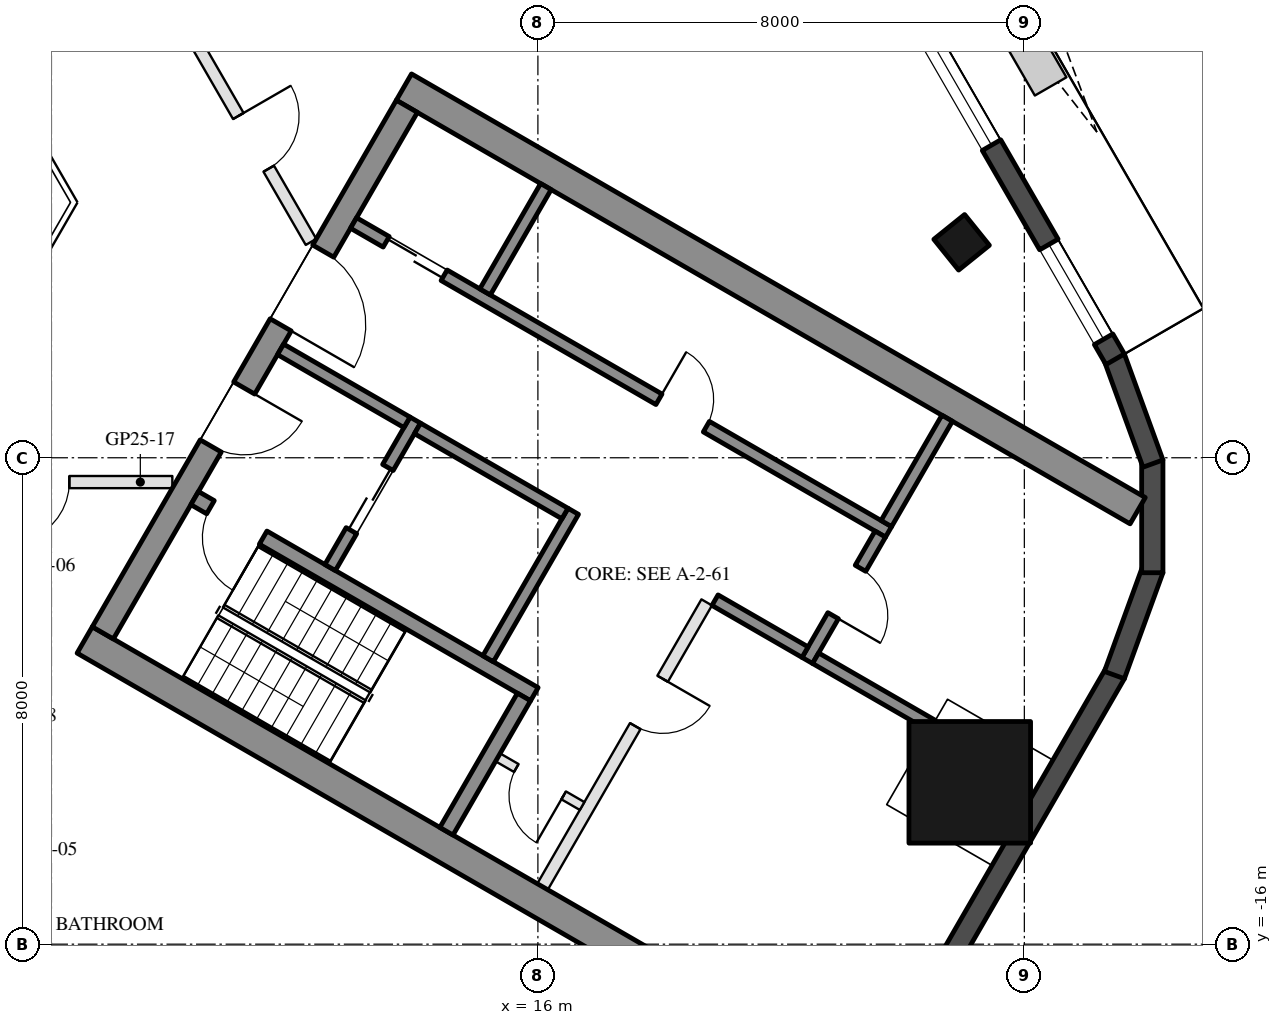
"""IFC4 building model, lengths in metres.
Left out: names, types, materials, properties, quantities, classifications, styles, units other than length and angle.
Written with IfcOpenShell. Run it as: python <this file> out.ifc"""

import sys

from ifc_helpers import new_model, si_unit, direction, frame, frame_2d, origin, origin_2d, place, context, subcontext, project, spatial, rectangle, hollow_rectangle, extrude, boolean, halfspace, element, fill, save


model = new_model("IFC4")
c1 = context("Model", 3, precision=1e-05, world=origin(), true_north=direction((0.0, 1.0)))
c2 = subcontext(c1, "Body", "Model", "MODEL_VIEW")
j1 = project(units=[si_unit("LENGTHUNIT", "METRE"), si_unit("PLANEANGLEUNIT", "RADIAN")], contexts=[c1])
p1 = place(None, origin())
s1 = spatial("IfcSite", under=j1, at=p1, CompositionType="ELEMENT")
p2 = place(p1, origin())
s2 = spatial("IfcBuilding", under=s1, at=p2, CompositionType="ELEMENT")
p3 = place(p2, frame((0.0, 0.0, 265.2)))
s3 = spatial("IfcBuildingStorey", under=s2, at=p3, CompositionType="ELEMENT", Elevation=265.2)
p4 = place(p3, frame((22.968, -4.457, 0.0), z_axis=(-0.190735471498, 0.029652697198, 0.981193506634), x_axis=(0.488320350716, -0.86422901804, 0.121043130549)))
e1 = element("IfcColumn", 1, at=p4, inside=s3, PredefinedType="COLUMN", context=c2, shape_type="SweptSolid", body=[
    boolean("DIFFERENCE", boolean("DIFFERENCE", extrude(hollow_rectangle(XDim=0.65, YDim=0.65, WallThickness=0.03, at=origin_2d()), origin(), (0.0, 0.0, 1.0), 3.771), halfspace(frame((0.0, 0.0, 0.047), z_axis=(0.0, 0.0, 1.0), x_axis=(1.0, 0.0, 0.0)), True)), halfspace(frame((0.0, 0.0, 3.724), z_axis=(0.0, 0.0, 1.0), x_axis=(1.0, 0.0, 0.0)), False)),
])
p5 = place(p3, frame((23.102, -13.338, 0.0), z_axis=(-0.190346159062, 0.109881938965, 0.975548204457), x_axis=(0.499994868029, 0.866028366632, 1.1507946e-05)))
e2 = element("IfcColumn", 2, at=p5, inside=s3, PredefinedType="COLUMN", context=c2, shape_type="SweptSolid", body=[
    boolean("DIFFERENCE", boolean("DIFFERENCE", extrude(hollow_rectangle(XDim=2.0, YDim=2.0, WallThickness=0.05, at=origin_2d()), origin(), (0.0, 0.0, 1.0), 3.793), halfspace(frame((0.0, 0.0, 0.113), z_axis=(0.0, 0.0, 1.0), x_axis=(1.0, 0.0, 0.0)), True)), halfspace(frame((0.0, 0.0, 3.679), z_axis=(0.0, 0.0, 1.0), x_axis=(1.0, 0.0, 0.0)), False)),
])
p6 = place(p3, frame((22.746, -16.305, 0.0), z_axis=(0.0, 0.0, 1.0), x_axis=(0.500028854569, 0.86600874395, 0.0)))
e3 = element("IfcWall", 3, at=p6, inside=s3, PredefinedType="SOLIDWALL", context=c2, shape_type="SweptSolid", body=[
    extrude(rectangle(XDim=5.495, YDim=0.35, at=frame_2d((2.748, 0.0))), origin(), (0.0, 0.0, 1.0), 3.55),
])
p7 = place(p3, frame((25.481, -11.574, 0.0), z_axis=(0.0, 0.0, 1.0), x_axis=(0.341890986265, 0.93973962006, 0.0)))
e4 = element("IfcWall", 4, at=p7, inside=s3, PredefinedType="SOLIDWALL", context=c2, shape_type="SweptSolid", body=[
    extrude(rectangle(XDim=1.855, YDim=0.35, at=frame_2d((0.928, 0.0))), origin(), (0.0, 0.0, 1.0), 3.55),
])
for number, where, z_axis, x_axis in (
    (5, (26.104, -9.891, 0.0), (0.0, 0.0, 1.0), (0.0, 1.0, 0.0)),
    (6, (26.115, -8.096, 0.0), (0.0, 0.0, 1.0), (-0.342, 0.94, 0.0)),
):
    element("IfcWall", number, at=place(p3, frame(where, z_axis=z_axis, x_axis=x_axis)), inside=s3, PredefinedType="SOLIDWALL", context=c2, shape_type="SweptSolid", body=[
        extrude(rectangle(XDim=1.855, YDim=0.35, at=frame_2d((0.927, 0.0))), origin(), (0.0, 0.0, 1.0), 3.55),
    ])
p8 = place(p3, frame((25.494, -6.38, 0.0), z_axis=(0.0, 0.0, 1.0), x_axis=(-0.499999932627, 0.866025442683, 0.0)))
e7 = element("IfcWall", 7, at=p8, inside=s3, PredefinedType="SOLIDWALL", context=c2, shape_type="SweptSolid", body=[
    extrude(rectangle(XDim=11.5, YDim=0.35, at=frame_2d((5.75, 0.0))), origin(), (0.0, 0.0, 1.0), 3.55),
])
p9 = place(p8, frame((0.38, 0.0, 0.3)))
e8 = element("IfcOpeningElement", 8, at=p9, cuts=e7, PredefinedType="OPENING", context=c2, shape_type="SweptSolid", body=[
    extrude(rectangle(XDim=1.8, YDim=2.65, at=frame_2d((0.9, 1.325))), frame((0.0, 0.185, 0.0), z_axis=(0.0, -1.0, 0.0), x_axis=(1.0, 0.0, 0.0)), (0.0, 0.0, 1.0), 0.37),
])
p10 = place(p8, frame((7.521, 0.0, 0.0)))
e9 = element("IfcOpeningElement", 9, at=p10, cuts=e7, PredefinedType="OPENING", context=c2, shape_type="SweptSolid", body=[
    extrude(rectangle(XDim=2.4, YDim=2.4, at=frame_2d((1.2, 1.2))), frame((0.0, 0.185, 0.0), z_axis=(0.0, -1.0, 0.0), x_axis=(1.0, 0.0, 0.0)), (0.0, 0.0, 1.0), 0.37),
])
p11 = place(p8, frame((4.067, 0.0, 0.3)))
e10 = element("IfcOpeningElement", 10, at=p11, cuts=e7, PredefinedType="OPENING", context=c2, shape_type="SweptSolid", body=[
    extrude(rectangle(XDim=3.1, YDim=2.65, at=frame_2d((1.55, 1.325))), frame((0.0, 0.185, 0.0), z_axis=(0.0, -1.0, 0.0), x_axis=(1.0, 0.0, 0.0)), (0.0, 0.0, 1.0), 0.37),
])
for number, where, z_axis, x_axis in (
    (11, (8.547, -10.997, 0.0), (0.0, 0.0, 1.0), (0.866, -0.5, 0.0)),
    (12, (13.797, -1.903, 0.0), (0.0, 0.0, 1.0), (0.866, -0.5, 0.0)),
):
    element("IfcWall", number, at=place(p3, frame(where, z_axis=z_axis, x_axis=x_axis)), inside=s3, PredefinedType="SHEAR", context=c2, shape_type="SweptSolid", body=[
        extrude(rectangle(XDim=13.934, YDim=0.5, at=frame_2d((6.967, 0.0))), origin(), (0.0, 0.0, 1.0), 3.5),
    ])
p12 = place(p3, frame((8.845, -10.88, 0.0), z_axis=(0.0, 0.0, 1.0), x_axis=(0.500004234368, 0.866022959057, 0.0)))
e13 = element("IfcWall", 13, at=p12, inside=s3, PredefinedType="SHEAR", context=c2, shape_type="SweptSolid", body=[
    extrude(rectangle(XDim=10.0, YDim=0.4, at=frame_2d((5.0, 0.0))), origin(), (0.0, 0.0, 1.0), 3.5),
])
p13 = place(p12, frame((3.55, 0.0, 0.0)))
e14 = element("IfcOpeningElement", 14, at=p13, cuts=e13, PredefinedType="OPENING", context=c2, shape_type="SweptSolid", body=[
    extrude(rectangle(XDim=1.1, YDim=2.1, at=frame_2d((0.55, 1.05))), frame((0.0, 0.21, 0.0), z_axis=(0.0, -1.0, 0.0), x_axis=(1.0, 0.0, 0.0)), (0.0, 0.0, 1.0), 0.42),
])
p14 = place(p12, frame((5.85, 0.0, 0.0)))
e15 = element("IfcOpeningElement", 15, at=p14, cuts=e13, PredefinedType="OPENING", context=c2, shape_type="SweptSolid", body=[
    extrude(rectangle(XDim=1.4, YDim=2.1, at=frame_2d((0.7, 1.05))), frame((0.0, 0.21, 0.0), z_axis=(0.0, -1.0, 0.0), x_axis=(1.0, 0.0, 0.0)), (0.0, 0.0, 1.0), 0.42),
])
p15 = place(p3, frame((10.356, -8.664, 0.0), z_axis=(0.0, 0.0, 1.0), x_axis=(0.866028629588, -0.499994412703, 0.0)))
e16 = element("IfcWall", 16, at=p15, inside=s3, PredefinedType="SHEAR", context=c2, shape_type="SweptSolid", body=[
    extrude(rectangle(XDim=6.45, YDim=0.25, at=frame_2d((3.225, 0.0))), origin(), (0.0, 0.0, 1.0), 3.5),
])
p16 = place(p15, frame((0.3, 0.0, 0.0)))
e17 = element("IfcOpeningElement", 17, at=p16, cuts=e16, PredefinedType="OPENING", context=c2, shape_type="SweptSolid", body=[
    extrude(rectangle(XDim=1.0, YDim=2.1, at=frame_2d((0.5, 1.05))), frame((0.0, 0.135, 0.0), z_axis=(0.0, -1.0, 0.0), x_axis=(1.0, 0.0, 0.0)), (0.0, 0.0, 1.0), 0.27),
])
p17 = place(p3, frame((14.496, -14.143, 0.0), z_axis=(0.0, 0.0, 1.0), x_axis=(0.500062241894, 0.865989465428, 0.0)))
e18 = element("IfcWall", 18, at=p17, inside=s3, PredefinedType="SHEAR", context=c2, shape_type="SweptSolid", body=[
    extrude(rectangle(XDim=2.55, YDim=0.25, at=frame_2d((1.275, 0.0))), origin(), (0.0, 0.0, 1.0), 3.5),
])
p18 = place(p3, frame((15.181, -11.305, 0.0), z_axis=(0.0, 0.0, 1.0), x_axis=(0.49994636267, 0.866056369097, 0.0)))
e19 = element("IfcWall", 19, at=p18, inside=s3, PredefinedType="SHEAR", context=c2, shape_type="SweptSolid", body=[
    extrude(rectangle(XDim=2.8, YDim=0.2, at=frame_2d((1.4, 0.0))), origin(), (0.0, 0.0, 1.0), 3.5),
])
p19 = place(p3, frame((12.583, -9.805, 0.0), z_axis=(0.0, 0.0, 1.0), x_axis=(0.49994636267, 0.866056369097, 0.0)))
e20 = element("IfcWall", 20, at=p19, inside=s3, PredefinedType="SHEAR", context=c2, shape_type="SweptSolid", body=[
    extrude(rectangle(XDim=2.8, YDim=0.2, at=frame_2d((1.4, 0.0))), origin(), (0.0, 0.0, 1.0), 3.5),
])
p20 = place(p19, frame((0.7, 0.0, 0.0)))
e21 = element("IfcOpeningElement", 21, at=p20, cuts=e20, PredefinedType="OPENING", context=c2, shape_type="SweptSolid", body=[
    extrude(rectangle(XDim=1.2, YDim=2.1, at=frame_2d((0.6, 1.05))), frame((0.0, 0.11, 0.0), z_axis=(0.0, -1.0, 0.0), x_axis=(1.0, 0.0, 0.0)), (0.0, 0.0, 1.0), 0.22),
])
p21 = place(p3, frame((11.768, -6.217, 0.0), z_axis=(0.0, 0.0, 1.0), x_axis=(0.866050077142, -0.499957262057, 0.0)))
e22 = element("IfcWall", 22, at=p21, inside=s3, PredefinedType="SHEAR", context=c2, shape_type="SweptSolid", body=[
    extrude(rectangle(XDim=2.4, YDim=0.2, at=frame_2d((1.2, 0.0))), origin(), (0.0, 0.0, 1.0), 3.5),
])
p22 = place(p3, frame((14.02, -7.517, 0.0), z_axis=(0.0, 0.0, 1.0), x_axis=(0.866034573852, -0.49998411664, 0.0)))
e23 = element("IfcWall", 23, at=p22, inside=s3, PredefinedType="SHEAR", context=c2, shape_type="SweptSolid", body=[
    extrude(rectangle(XDim=2.8, YDim=0.2, at=frame_2d((1.4, 0.0))), origin(), (0.0, 0.0, 1.0), 3.5),
])
p23 = place(p3, frame((12.968, -4.138, 0.0), z_axis=(0.0, 0.0, 1.0), x_axis=(0.866028328073, -0.49999493495, 0.0)))
e24 = element("IfcWall", 24, at=p23, inside=s3, PredefinedType="SHEAR", context=c2, shape_type="SweptSolid", body=[
    extrude(rectangle(XDim=10.16, YDim=0.2, at=frame_2d((5.08, 0.0))), origin(), (0.0, 0.0, 1.0), 3.5),
])
p24 = place(p23, frame((0.62, 0.0, 0.0)))
e25 = element("IfcOpeningElement", 25, at=p24, cuts=e24, PredefinedType="OPENING", context=c2, shape_type="SweptSolid", body=[
    extrude(rectangle(XDim=1.1, YDim=2.1, at=frame_2d((0.55, 1.05))), frame((0.0, 0.11, 0.0), z_axis=(0.0, -1.0, 0.0), x_axis=(1.0, 0.0, 0.0)), (0.0, 0.0, 1.0), 0.22),
])
p25 = place(p23, frame((5.8, 0.0, 0.0)))
e26 = element("IfcOpeningElement", 26, at=p25, cuts=e24, PredefinedType="OPENING", context=c2, shape_type="SweptSolid", body=[
    extrude(rectangle(XDim=0.9, YDim=2.1, at=frame_2d((0.45, 1.05))), frame((0.0, 0.11, 0.0), z_axis=(0.0, -1.0, 0.0), x_axis=(1.0, 0.0, 0.0)), (0.0, 0.0, 1.0), 0.22),
])
p26 = place(p3, frame((20.43, -11.333, 0.0), z_axis=(0.0, 0.0, 1.0), x_axis=(0.500001309137, 0.866024647952, 0.0)))
e27 = element("IfcWall", 27, at=p26, inside=s3, PredefinedType="SHEAR", context=c2, shape_type="SweptSolid", body=[
    extrude(rectangle(XDim=2.4, YDim=0.2, at=frame_2d((1.2, 0.0))), origin(), (0.0, 0.0, 1.0), 3.5),
])
p27 = place(p26, frame((0.85, 0.0, 0.0)))
e28 = element("IfcOpeningElement", 28, at=p27, cuts=e27, PredefinedType="OPENING", context=c2, shape_type="SweptSolid", body=[
    extrude(rectangle(XDim=0.9, YDim=2.1, at=frame_2d((0.45, 1.05))), frame((0.0, 0.11, 0.0), z_axis=(0.0, -1.0, 0.0), x_axis=(1.0, 0.0, 0.0)), (0.0, 0.0, 1.0), 0.22),
])
p28 = place(p3, frame((18.913, -10.342, 0.0), z_axis=(0.0, 0.0, 1.0), x_axis=(0.866038183914, -0.499977863513, 0.0)))
e29 = element("IfcWall", 29, at=p28, inside=s3, PredefinedType="SHEAR", context=c2, shape_type="SweptSolid", body=[
    extrude(rectangle(XDim=1.71, YDim=0.2, at=frame_2d((0.855, 0.0))), origin(), (0.0, 0.0, 1.0), 3.5),
])
for number, where, z_axis, x_axis in (
    (30, (15.131, -5.272, 0.0), (0.0, 0.0, 1.0), (0.5, 0.866, 0.0)),
    (31, (21.73, -9.082, 0.0), (0.0, 0.0, 1.0), (0.5, 0.866, 0.0)),
):
    element("IfcWall", number, at=place(p3, frame(where, z_axis=z_axis, x_axis=x_axis)), inside=s3, PredefinedType="SHEAR", context=c2, shape_type="SweptSolid", body=[
        extrude(rectangle(XDim=2.0, YDim=0.2, at=frame_2d((1.0, 0.0))), origin(), (0.0, 0.0, 1.0), 3.5),
    ])
p29 = place(p3, frame((20.567, -11.297, 0.0), z_axis=(0.0, 0.0, 1.0), x_axis=(0.866079196458, -0.49990681678, 0.0)))
e32 = element("IfcWall", 32, at=p29, inside=s3, PredefinedType="SHEAR", context=c2, shape_type="SweptSolid", body=[
    extrude(rectangle(XDim=2.216, YDim=0.2, at=frame_2d((1.108, 0.0))), origin(), (0.0, 0.0, 1.0), 3.5),
])
p30 = place(p3, frame((16.076, -15.055, 0.0), z_axis=(0.0, 0.0, 1.0), x_axis=(0.499995103361, 0.866028230842, 0.0)))
e33 = element("IfcWall", 33, at=p30, inside=s3, PredefinedType="PARTITIONING", context=c2, shape_type="SweptSolid", body=[
    extrude(rectangle(XDim=5.4, YDim=0.2, at=frame_2d((2.7, 0.0))), origin(), (0.0, 0.0, 1.0), 3.5),
])
p31 = place(p30, frame((3.05, 0.0, 0.0)))
e34 = element("IfcOpeningElement", 34, at=p31, cuts=e33, PredefinedType="OPENING", context=c2, shape_type="SweptSolid", body=[
    extrude(rectangle(XDim=0.9, YDim=2.1, at=frame_2d((0.45, 1.05))), frame((0.0, 0.11, 0.0), z_axis=(0.0, -1.0, 0.0), x_axis=(1.0, 0.0, 0.0)), (0.0, 0.0, 1.0), 0.22),
])
p32 = place(p3, frame((15.342, -12.928, 0.0), z_axis=(0.0, 0.0, 1.0), x_axis=(0.865989903783, -0.500061482766, 0.0)))
e35 = element("IfcWall", 35, at=p32, inside=s3, PredefinedType="PARTITIONING", context=c2, shape_type="SweptSolid", body=[
    extrude(rectangle(XDim=1.6, YDim=0.15, at=frame_2d((0.8, 0.0))), origin(), (0.0, 0.0, 1.0), 3.5),
])
p33 = place(p32, frame((0.35, 0.0, 0.0)))
e36 = element("IfcOpeningElement", 36, at=p33, cuts=e35, PredefinedType="OPENING", context=c2, shape_type="SweptSolid", body=[
    extrude(rectangle(XDim=0.9, YDim=2.1, at=frame_2d((0.45, 1.05))), frame((0.0, 0.085, 0.0), z_axis=(0.0, -1.0, 0.0), x_axis=(1.0, 0.0, 0.0)), (0.0, 0.0, 1.0), 0.17),
])
p34 = place(p3, frame((9.988, -8.4, 0.0), z_axis=(0.0, 0.0, 1.0), x_axis=(-1.0, 0.0, 0.0)))
e37 = element("IfcWall", 37, at=p34, inside=s3, PredefinedType="PARTITIONING", context=c2, shape_type="SweptSolid", body=[
    extrude(rectangle(XDim=4.388, YDim=0.2, at=frame_2d((2.194, 0.0))), origin(), (0.0, 0.0, 1.0), 3.0),
])
p35 = place(p34, frame((1.694, 0.0, 0.0)))
e38 = element("IfcOpeningElement", 38, at=p35, cuts=e37, PredefinedType="OPENING", context=c2, shape_type="SweptSolid", body=[
    extrude(rectangle(XDim=1.0, YDim=2.1, at=frame_2d((0.5, 1.05))), frame((0.0, 0.11, 0.0), z_axis=(0.0, -1.0, 0.0), x_axis=(1.0, 0.0, 0.0)), (0.0, 0.0, 1.0), 0.22),
])
p36 = place(p3, frame((10.378, -1.175, 0.0), z_axis=(0.0, 0.0, 1.0), x_axis=(0.50004096614, -0.86600175068, 0.0)))
e39 = element("IfcWall", 39, at=p36, inside=s3, PredefinedType="PARTITIONING", context=c2, shape_type="SweptSolid", body=[
    extrude(rectangle(XDim=3.782, YDim=0.2, at=frame_2d((1.891, 0.0))), origin(), (0.0, 0.0, 1.0), 3.0),
])
p37 = place(p36, frame((1.391, 0.0, 0.0)))
e40 = element("IfcOpeningElement", 40, at=p37, cuts=e39, PredefinedType="OPENING", context=c2, shape_type="SweptSolid", body=[
    extrude(rectangle(XDim=1.0, YDim=2.1, at=frame_2d((0.5, 1.05))), frame((0.0, 0.11, 0.0), z_axis=(0.0, -1.0, 0.0), x_axis=(1.0, 0.0, 0.0)), (0.0, 0.0, 1.0), 0.22),
])
p38 = place(p9, origin())
e41 = element("IfcWindow", 41, at=p38, inside=s3, PartitioningType="SINGLE_PANEL", PredefinedType="WINDOW", context=c2, shape_type="SweptSolid", body=[
    extrude(rectangle(XDim=1.8, YDim=2.65, at=frame_2d((0.9, 1.325))), frame((0.0, 0.03, 0.0), z_axis=(0.0, -1.0, 0.0), x_axis=(1.0, 0.0, 0.0)), (0.0, 0.0, 1.0), 0.06),
])
fill(e8, e41)
p39 = place(p11, origin())
e42 = element("IfcWindow", 42, at=p39, inside=s3, PartitioningType="SINGLE_PANEL", PredefinedType="WINDOW", context=c2, shape_type="SweptSolid", body=[
    extrude(rectangle(XDim=3.1, YDim=2.65, at=frame_2d((1.55, 1.325))), frame((0.0, 0.03, 0.0), z_axis=(0.0, -1.0, 0.0), x_axis=(1.0, 0.0, 0.0)), (0.0, 0.0, 1.0), 0.06),
])
fill(e10, e42)
p40 = place(p20, origin())
e43 = element("IfcDoor", 43, at=p40, inside=s3, OperationType="DOUBLE_DOOR_SLIDING", PredefinedType="DOOR", context=c2, shape_type="SweptSolid", body=[
    extrude(rectangle(XDim=1.2, YDim=2.1, at=frame_2d((0.6, 1.05))), frame((0.0, 0.025, 0.0), z_axis=(0.0, -1.0, 0.0), x_axis=(1.0, 0.0, 0.0)), (0.0, 0.0, 1.0), 0.05),
])
fill(e21, e43)
p41 = place(p33, frame((0.9, 0.0, 0.0), z_axis=(0.0, 0.0, 1.0), x_axis=(-1.0, 0.0, 0.0)))
e44 = element("IfcDoor", 44, at=p41, inside=s3, OperationType="SINGLE_SWING_LEFT", PredefinedType="DOOR", context=c2, shape_type="SweptSolid", body=[
    extrude(rectangle(XDim=0.9, YDim=2.1, at=frame_2d((0.45, 1.05))), frame((0.0, 0.025, 0.0), z_axis=(0.0, -1.0, 0.0), x_axis=(1.0, 0.0, 0.0)), (0.0, 0.0, 1.0), 0.05),
])
fill(e36, e44)
p42 = place(p24, origin())
e45 = element("IfcDoor", 45, at=p42, inside=s3, OperationType="DOUBLE_DOOR_SLIDING", PredefinedType="DOOR", context=c2, shape_type="SweptSolid", body=[
    extrude(rectangle(XDim=1.1, YDim=2.1, at=frame_2d((0.55, 1.05))), frame((0.0, 0.025, 0.0), z_axis=(0.0, -1.0, 0.0), x_axis=(1.0, 0.0, 0.0)), (0.0, 0.0, 1.0), 0.05),
])
fill(e25, e45)
p43 = place(p25, origin())
e46 = element("IfcDoor", 46, at=p43, inside=s3, OperationType="SINGLE_SWING_LEFT", PredefinedType="DOOR", context=c2, shape_type="SweptSolid", body=[
    extrude(rectangle(XDim=0.9, YDim=2.1, at=frame_2d((0.45, 1.05))), frame((0.0, 0.025, 0.0), z_axis=(0.0, -1.0, 0.0), x_axis=(1.0, 0.0, 0.0)), (0.0, 0.0, 1.0), 0.05),
])
fill(e26, e46)
p44 = place(p27, frame((0.9, 0.0, 0.0), z_axis=(0.0, 0.0, 1.0), x_axis=(-1.0, 0.0, 0.0)))
e47 = element("IfcDoor", 47, at=p44, inside=s3, OperationType="SINGLE_SWING_RIGHT", PredefinedType="DOOR", context=c2, shape_type="SweptSolid", body=[
    extrude(rectangle(XDim=0.9, YDim=2.1, at=frame_2d((0.45, 1.05))), frame((0.0, 0.025, 0.0), z_axis=(0.0, -1.0, 0.0), x_axis=(1.0, 0.0, 0.0)), (0.0, 0.0, 1.0), 0.05),
])
fill(e28, e47)
p45 = place(p31, frame((0.9, 0.0, 0.0), z_axis=(0.0, 0.0, 1.0), x_axis=(-1.0, 0.0, 0.0)))
e48 = element("IfcDoor", 48, at=p45, inside=s3, OperationType="SINGLE_SWING_LEFT", PredefinedType="DOOR", context=c2, shape_type="SweptSolid", body=[
    extrude(rectangle(XDim=0.9, YDim=2.1, at=frame_2d((0.45, 1.05))), frame((0.0, 0.025, 0.0), z_axis=(0.0, -1.0, 0.0), x_axis=(1.0, 0.0, 0.0)), (0.0, 0.0, 1.0), 0.05),
])
fill(e34, e48)
p46 = place(p13, frame((1.1, 0.0, 0.0), z_axis=(0.0, 0.0, 1.0), x_axis=(-1.0, 0.0, 0.0)))
e49 = element("IfcDoor", 49, at=p46, inside=s3, OperationType="SINGLE_SWING_LEFT", PredefinedType="DOOR", context=c2, shape_type="SweptSolid", body=[
    extrude(rectangle(XDim=1.1, YDim=2.1, at=frame_2d((0.55, 1.05))), frame((0.0, 0.025, 0.0), z_axis=(0.0, -1.0, 0.0), x_axis=(1.0, 0.0, 0.0)), (0.0, 0.0, 1.0), 0.05),
])
fill(e14, e49)
p47 = place(p14, frame((1.4, 0.0, 0.0), z_axis=(0.0, 0.0, 1.0), x_axis=(-1.0, 0.0, 0.0)))
e50 = element("IfcDoor", 50, at=p47, inside=s3, OperationType="DOUBLE_DOOR_SINGLE_SWING", PredefinedType="DOOR", context=c2, shape_type="SweptSolid", body=[
    extrude(rectangle(XDim=1.4, YDim=2.1, at=frame_2d((0.7, 1.05))), frame((0.0, 0.025, 0.0), z_axis=(0.0, -1.0, 0.0), x_axis=(1.0, 0.0, 0.0)), (0.0, 0.0, 1.0), 0.05),
])
fill(e15, e50)
p48 = place(p16, frame((1.0, 0.0, 0.0), z_axis=(0.0, 0.0, 1.0), x_axis=(-1.0, 0.0, 0.0)))
e51 = element("IfcDoor", 51, at=p48, inside=s3, OperationType="SINGLE_SWING_LEFT", PredefinedType="DOOR", context=c2, shape_type="SweptSolid", body=[
    extrude(rectangle(XDim=1.0, YDim=2.1, at=frame_2d((0.5, 1.05))), frame((0.0, 0.025, 0.0), z_axis=(0.0, -1.0, 0.0), x_axis=(1.0, 0.0, 0.0)), (0.0, 0.0, 1.0), 0.05),
])
fill(e17, e51)
p49 = place(p35, origin())
e52 = element("IfcDoor", 52, at=p49, inside=s3, OperationType="SINGLE_SWING_RIGHT", PredefinedType="DOOR", context=c2, shape_type="SweptSolid", body=[
    extrude(rectangle(XDim=1.0, YDim=2.1, at=frame_2d((0.5, 1.05))), frame((0.0, 0.025, 0.0), z_axis=(0.0, -1.0, 0.0), x_axis=(1.0, 0.0, 0.0)), (0.0, 0.0, 1.0), 0.05),
])
fill(e38, e52)
p50 = place(p37, origin())
e53 = element("IfcDoor", 53, at=p50, inside=s3, OperationType="SINGLE_SWING_LEFT", PredefinedType="DOOR", context=c2, shape_type="SweptSolid", body=[
    extrude(rectangle(XDim=1.0, YDim=2.1, at=frame_2d((0.5, 1.05))), frame((0.0, 0.025, 0.0), z_axis=(0.0, -1.0, 0.0), x_axis=(1.0, 0.0, 0.0)), (0.0, 0.0, 1.0), 0.05),
])
fill(e40, e53)
save(model, sys.argv[1])
